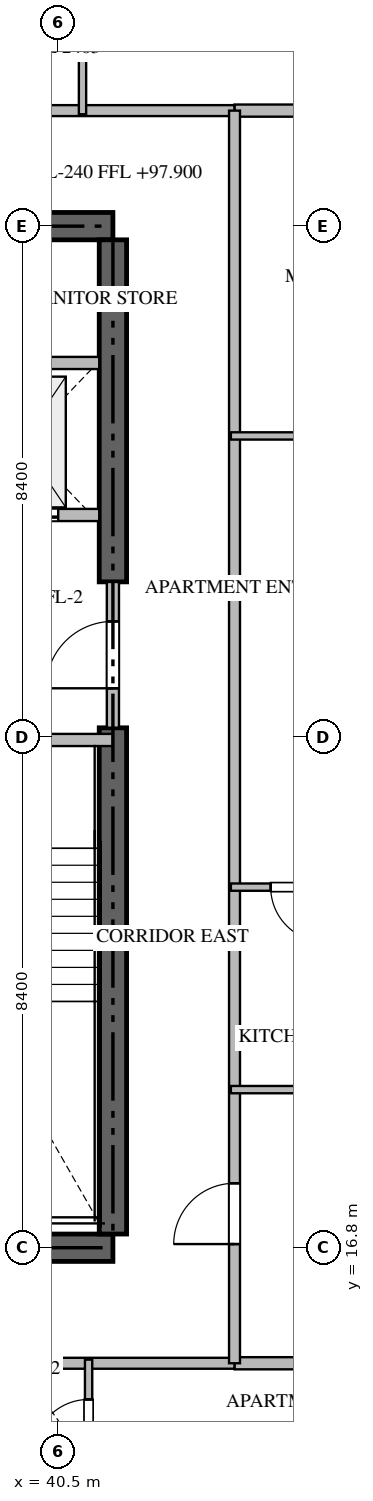
"""IFC4 building model, lengths in metres.
Left out: names, types, materials, properties, quantities, classifications, styles, units other than length and angle.
Written with IfcOpenShell. Run it as: python <this file> out.ifc"""

import sys

from ifc_helpers import new_model, si_unit, direction, frame, frame_2d, origin, place, context, subcontext, project, spatial, rectangle, extrude, source, transform, mapped, element, fill, save


model = new_model("IFC4")
c1 = context("Model", 3, precision=1e-05, world=origin(), true_north=direction((0.0, 1.0)))
c2 = subcontext(c1, "Body", "Model", "MODEL_VIEW")
j1 = project(units=[si_unit("LENGTHUNIT", "METRE"), si_unit("PLANEANGLEUNIT", "RADIAN")], contexts=[c1])
p1 = place(None, origin())
s1 = spatial("IfcSite", under=j1, at=p1, CompositionType="ELEMENT")
p2 = place(p1, origin())
s2 = spatial("IfcBuilding", under=s1, at=p2, CompositionType="ELEMENT")
p3 = place(p2, frame((0.0, 0.0, 97.95)))
s3 = spatial("IfcBuildingStorey", under=s2, at=p3, CompositionType="ELEMENT", Elevation=97.95)
for number, where, z_axis, x_axis in (
    (1, (23.4, 16.8, -0.26), (0.0, 0.0, 1.0), (1.0, 0.0, 0.0)),
    (2, (41.4, 33.6, -0.26), (0.0, 0.0, 1.0), (-1.0, 0.0, 0.0)),
):
    element("IfcWall", number, at=place(p3, frame(where, z_axis=z_axis, x_axis=x_axis)), inside=s3, PredefinedType="SHEAR", context=c2, shape_type="SweptSolid", body=[
        extrude(rectangle(XDim=18.0, YDim=0.45, at=frame_2d((9.0, 0.0))), origin(), (0.0, 0.0, 1.0), 3.748),
    ])
p4 = place(p3, frame((41.4, 17.025, -0.26), z_axis=(0.0, 0.0, 1.0), x_axis=(0.0, 1.0, 0.0)))
e3 = element("IfcWall", 3, at=p4, inside=s3, PredefinedType="SHEAR", context=c2, shape_type="SweptSolid", body=[
    extrude(rectangle(XDim=8.325, YDim=0.45, at=frame_2d((4.163, 0.0))), origin(), (0.0, 0.0, 1.0), 3.748),
])
p5 = place(p3, frame((41.4, 27.75, -0.26), z_axis=(0.0, 0.0, 1.0), x_axis=(0.0, 1.0, 0.0)))
e4 = element("IfcWall", 4, at=p5, inside=s3, PredefinedType="SHEAR", context=c2, shape_type="SweptSolid", body=[
    extrude(rectangle(XDim=5.625, YDim=0.45, at=frame_2d((2.812, 0.0))), origin(), (0.0, 0.0, 1.0), 3.748),
])
p6 = place(p3, frame((36.95, 25.15, 0.0), z_axis=(0.0, 0.0, 1.0), x_axis=(1.0, 0.0, 0.0)))
e5 = element("IfcWall", 5, at=p6, inside=s3, PredefinedType="STANDARD", context=c2, shape_type="SweptSolid", body=[
    extrude(rectangle(XDim=4.45, YDim=0.2, at=frame_2d((2.225, 0.0))), origin(), (0.0, 0.0, 1.0), 3.49),
])
p7 = place(p6, frame((1.65, 0.0, 0.0)))
e6 = element("IfcOpeningElement", 6, at=p7, cuts=e5, PredefinedType="OPENING", context=c2, shape_type="SweptSolid", body=[
    extrude(rectangle(XDim=1.1, YDim=2.15, at=frame_2d((0.55, 1.075))), frame((0.0, 0.11, 0.0), z_axis=(0.0, -1.0, 0.0), x_axis=(1.0, 0.0, 0.0)), (0.0, 0.0, 1.0), 0.22),
])
p8 = place(p3, frame((38.75, 28.85, 0.0), z_axis=(0.0, 0.0, 1.0), x_axis=(1.0, 0.0, 0.0)))
e7 = element("IfcWall", 7, at=p8, inside=s3, PredefinedType="STANDARD", context=c2, shape_type="SweptSolid", body=[
    extrude(rectangle(XDim=2.425, YDim=0.2, at=frame_2d((1.212, 0.0))), origin(), (0.0, 0.0, 1.0), 3.49),
])
p9 = place(p8, frame((0.55, 0.0, 0.0)))
e8 = element("IfcOpeningElement", 8, at=p9, cuts=e7, PredefinedType="OPENING", context=c2, shape_type="SweptSolid", body=[
    extrude(rectangle(XDim=1.2, YDim=2.2, at=frame_2d((0.6, 1.1))), frame((0.0, 0.11, 0.0), z_axis=(0.0, -1.0, 0.0), x_axis=(1.0, 0.0, 0.0)), (0.0, 0.0, 1.0), 0.22),
])
p10 = place(p3, frame((38.75, 31.35, 0.0), z_axis=(0.0, 0.0, 1.0), x_axis=(1.0, 0.0, 0.0)))
e9 = element("IfcWall", 9, at=p10, inside=s3, PredefinedType="STANDARD", context=c2, shape_type="SweptSolid", body=[
    extrude(rectangle(XDim=2.425, YDim=0.2, at=frame_2d((1.212, 0.0))), origin(), (0.0, 0.0, 1.0), 3.49),
])
p11 = place(p3, frame((41.4, 25.352, 0.0), z_axis=(0.0, 0.0, 1.0), x_axis=(0.0, 1.0, 0.0)))
e10 = element("IfcWall", 10, at=p11, inside=s3, PredefinedType="STANDARD", context=c2, shape_type="SweptSolid", body=[
    extrude(rectangle(XDim=2.396, YDim=0.2, at=frame_2d((1.198, 0.0))), origin(), (0.0, 0.0, 1.0), 3.49),
])
p12 = place(p11, frame((0.648, 0.0, 0.0)))
e11 = element("IfcOpeningElement", 11, at=p12, cuts=e10, PredefinedType="OPENING", context=c2, shape_type="SweptSolid", body=[
    extrude(rectangle(XDim=1.1, YDim=2.15, at=frame_2d((0.55, 1.075))), frame((0.0, 0.11, 0.0), z_axis=(0.0, -1.0, 0.0), x_axis=(1.0, 0.0, 0.0)), (0.0, 0.0, 1.0), 0.22),
])
for number, where, z_axis, x_axis in (
    (12, (43.4, 14.9, 0.0), (0.0, 0.0, 1.0), (1.0, 0.0, 0.0)),
    (13, (43.4, 35.5, 0.0), (0.0, 0.0, 1.0), (1.0, 0.0, 0.0)),
):
    element("IfcWall", number, at=place(p3, frame(where, z_axis=z_axis, x_axis=x_axis)), inside=s3, PredefinedType="PARTITIONING", context=c2, shape_type="SweptSolid", body=[
        extrude(rectangle(XDim=15.318, YDim=0.2, at=frame_2d((7.659, 0.0))), origin(), (0.0, 0.0, 1.0), 3.49),
    ])
p13 = place(p3, frame((21.402, 14.9, 0.0), z_axis=(0.0, 0.0, 1.0), x_axis=(1.0, 0.0, 0.0)))
e14 = element("IfcWall", 14, at=p13, inside=s3, PredefinedType="PARTITIONING", context=c2, shape_type="SweptSolid", body=[
    extrude(rectangle(XDim=21.996, YDim=0.18, at=frame_2d((10.998, 0.0))), origin(), (0.0, 0.0, 1.0), 3.49),
])
p14 = place(p13, frame((7.454, 0.0, 0.0)))
e15 = element("IfcOpeningElement", 15, at=p14, cuts=e14, PredefinedType="OPENING", context=c2, shape_type="SweptSolid", body=[
    extrude(rectangle(XDim=1.0, YDim=2.15, at=frame_2d((0.5, 1.075))), frame((0.0, 0.1, 0.0), z_axis=(0.0, -1.0, 0.0), x_axis=(1.0, 0.0, 0.0)), (0.0, 0.0, 1.0), 0.2),
])
p15 = place(p13, frame((13.542, 0.0, 0.0)))
e16 = element("IfcOpeningElement", 16, at=p15, cuts=e14, PredefinedType="OPENING", context=c2, shape_type="SweptSolid", body=[
    extrude(rectangle(XDim=1.0, YDim=2.15, at=frame_2d((0.5, 1.075))), frame((0.0, 0.1, 0.0), z_axis=(0.0, -1.0, 0.0), x_axis=(1.0, 0.0, 0.0)), (0.0, 0.0, 1.0), 0.2),
])
p16 = place(p3, frame((21.402, 35.5, 0.0), z_axis=(0.0, 0.0, 1.0), x_axis=(1.0, 0.0, 0.0)))
e17 = element("IfcWall", 17, at=p16, inside=s3, PredefinedType="PARTITIONING", context=c2, shape_type="SweptSolid", body=[
    extrude(rectangle(XDim=21.996, YDim=0.18, at=frame_2d((10.998, 0.0))), origin(), (0.0, 0.0, 1.0), 3.49),
])
p17 = place(p16, frame((7.202, 0.0, 0.0)))
e18 = element("IfcOpeningElement", 18, at=p17, cuts=e17, PredefinedType="OPENING", context=c2, shape_type="SweptSolid", body=[
    extrude(rectangle(XDim=1.0, YDim=2.15, at=frame_2d((0.5, 1.075))), frame((0.0, 0.1, 0.0), z_axis=(0.0, -1.0, 0.0), x_axis=(1.0, 0.0, 0.0)), (0.0, 0.0, 1.0), 0.2),
])
p18 = place(p3, frame((43.4, 14.9, 0.0), z_axis=(0.0, 0.0, 1.0), x_axis=(0.0, 1.0, 0.0)))
e19 = element("IfcWall", 19, at=p18, inside=s3, PredefinedType="PARTITIONING", context=c2, shape_type="SweptSolid", body=[
    extrude(rectangle(XDim=20.6, YDim=0.18, at=frame_2d((10.3, 0.0))), origin(), (0.0, 0.0, 1.0), 3.49),
])
p19 = place(p18, frame((1.96, 0.0, 0.0)))
e20 = element("IfcOpeningElement", 20, at=p19, cuts=e19, PredefinedType="OPENING", context=c2, shape_type="SweptSolid", body=[
    extrude(rectangle(XDim=1.0, YDim=2.15, at=frame_2d((0.5, 1.075))), frame((0.0, 0.1, 0.0), z_axis=(0.0, -1.0, 0.0), x_axis=(1.0, 0.0, 0.0)), (0.0, 0.0, 1.0), 0.2),
])
p20 = place(p3, frame((41.0, 12.75, 0.0), z_axis=(0.0, 0.0, 1.0), x_axis=(0.0, 1.0, 0.0)))
e21 = element("IfcWall", 21, at=p20, inside=s3, PredefinedType="PARTITIONING", context=c2, shape_type="SweptSolid", body=[
    extrude(rectangle(XDim=2.21, YDim=0.12, at=frame_2d((1.105, 0.0))), origin(), (0.0, 0.0, 1.0), 3.49),
])
p21 = place(p20, frame((0.655, 0.0, 0.0)))
e22 = element("IfcOpeningElement", 22, at=p21, cuts=e21, PredefinedType="OPENING", context=c2, shape_type="SweptSolid", body=[
    extrude(rectangle(XDim=0.9, YDim=2.1, at=frame_2d((0.45, 1.05))), frame((0.0, 0.07, 0.0), z_axis=(0.0, -1.0, 0.0), x_axis=(1.0, 0.0, 0.0)), (0.0, 0.0, 1.0), 0.14),
])
p22 = place(p3, frame((40.9, 37.648, 0.0), z_axis=(0.0, 0.0, 1.0), x_axis=(0.0, -1.0, 0.0)))
e23 = element("IfcWall", 23, at=p22, inside=s3, PredefinedType="PARTITIONING", context=c2, shape_type="SweptSolid", body=[
    extrude(rectangle(XDim=2.208, YDim=0.12, at=frame_2d((1.104, 0.0))), origin(), (0.0, 0.0, 1.0), 3.49),
])
p23 = place(p3, frame((46.15, 19.4, 0.0), z_axis=(0.0, 0.0, 1.0), x_axis=(-1.0, 0.0, 0.0)))
e24 = element("IfcWall", 24, at=p23, inside=s3, PredefinedType="PARTITIONING", context=c2, shape_type="SweptSolid", body=[
    extrude(rectangle(XDim=2.81, YDim=0.12, at=frame_2d((1.405, 0.0))), origin(), (0.0, 0.0, 1.0), 3.49),
])
p24 = place(p3, frame((45.55, 22.73, 0.0), z_axis=(0.0, 0.0, 1.0), x_axis=(-1.0, 0.0, 0.0)))
e25 = element("IfcWall", 25, at=p24, inside=s3, PredefinedType="PARTITIONING", context=c2, shape_type="SweptSolid", body=[
    extrude(rectangle(XDim=2.21, YDim=0.12, at=frame_2d((1.105, 0.0))), origin(), (0.0, 0.0, 1.0), 3.49),
])
p25 = place(p24, frame((0.655, 0.0, 0.0)))
e26 = element("IfcOpeningElement", 26, at=p25, cuts=e25, PredefinedType="OPENING", context=c2, shape_type="SweptSolid", body=[
    extrude(rectangle(XDim=0.9, YDim=2.1, at=frame_2d((0.45, 1.05))), frame((0.0, 0.07, 0.0), z_axis=(0.0, -1.0, 0.0), x_axis=(1.0, 0.0, 0.0)), (0.0, 0.0, 1.0), 0.14),
])
p26 = place(p3, frame((45.548, 30.15, 0.0), z_axis=(0.0, 0.0, 1.0), x_axis=(-1.0, 0.0, 0.0)))
e27 = element("IfcWall", 27, at=p26, inside=s3, PredefinedType="PARTITIONING", context=c2, shape_type="SweptSolid", body=[
    extrude(rectangle(XDim=2.208, YDim=0.12, at=frame_2d((1.104, 0.0))), origin(), (0.0, 0.0, 1.0), 3.49),
])
m1 = source(origin(), c2, "Body", "SweptSolid", [
    extrude(rectangle(XDim=1.2, YDim=2.2, at=frame_2d((0.6, 1.1))), frame((0.0, 0.025, 0.0), z_axis=(0.0, -1.0, 0.0), x_axis=(1.0, 0.0, 0.0)), (0.0, 0.0, 1.0), 0.05),
])
p27 = place(p9, origin())
e28 = element("IfcDoor", 28, at=p27, inside=s3, OperationType="DOUBLE_DOOR_SLIDING", PredefinedType="DOOR", context=c2, shape_type="MappedRepresentation", body=[
    mapped(m1, transform((0.0, 0.0, 0.0), scale=1.0)),
])
fill(e8, e28)
m2 = source(origin(), c2, "Body", "SweptSolid", [
    extrude(rectangle(XDim=1.1, YDim=2.15, at=frame_2d((0.55, 1.075))), frame((0.0, 0.025, 0.0), z_axis=(0.0, -1.0, 0.0), x_axis=(1.0, 0.0, 0.0)), (0.0, 0.0, 1.0), 0.05),
])
p28 = place(p12, origin())
e29 = element("IfcDoor", 29, at=p28, inside=s3, OperationType="SINGLE_SWING_LEFT", PredefinedType="DOOR", context=c2, shape_type="MappedRepresentation", body=[
    mapped(m2, transform((0.0, 0.0, 0.0), scale=1.0)),
])
fill(e11, e29)
m3 = source(origin(), c2, "Body", "SweptSolid", [
    extrude(rectangle(XDim=1.0, YDim=2.15, at=frame_2d((0.5, 1.075))), frame((0.0, 0.025, 0.0), z_axis=(0.0, -1.0, 0.0), x_axis=(1.0, 0.0, 0.0)), (0.0, 0.0, 1.0), 0.05),
])
p29 = place(p19, origin())
e30 = element("IfcDoor", 30, at=p29, inside=s3, OperationType="SINGLE_SWING_LEFT", PredefinedType="DOOR", context=c2, shape_type="MappedRepresentation", body=[
    mapped(m3, transform((0.0, 0.0, 0.0), scale=1.0)),
])
fill(e20, e30)
m4 = source(origin(), c2, "Body", "SweptSolid", [
    extrude(rectangle(XDim=0.9, YDim=2.1, at=frame_2d((0.45, 1.05))), frame((0.0, 0.025, 0.0), z_axis=(0.0, -1.0, 0.0), x_axis=(1.0, 0.0, 0.0)), (0.0, 0.0, 1.0), 0.05),
])
p30 = place(p21, origin())
e31 = element("IfcDoor", 31, at=p30, inside=s3, OperationType="SINGLE_SWING_LEFT", PredefinedType="DOOR", context=c2, shape_type="MappedRepresentation", body=[
    mapped(m4, transform((0.0, 0.0, 0.0), scale=1.0)),
])
fill(e22, e31)
p31 = place(p25, origin())
e32 = element("IfcDoor", 32, at=p31, inside=s3, OperationType="SINGLE_SWING_LEFT", PredefinedType="DOOR", context=c2, shape_type="MappedRepresentation", body=[
    mapped(m4, transform((0.0, 0.0, 0.0), scale=1.0)),
])
fill(e26, e32)
save(model, sys.argv[1])
